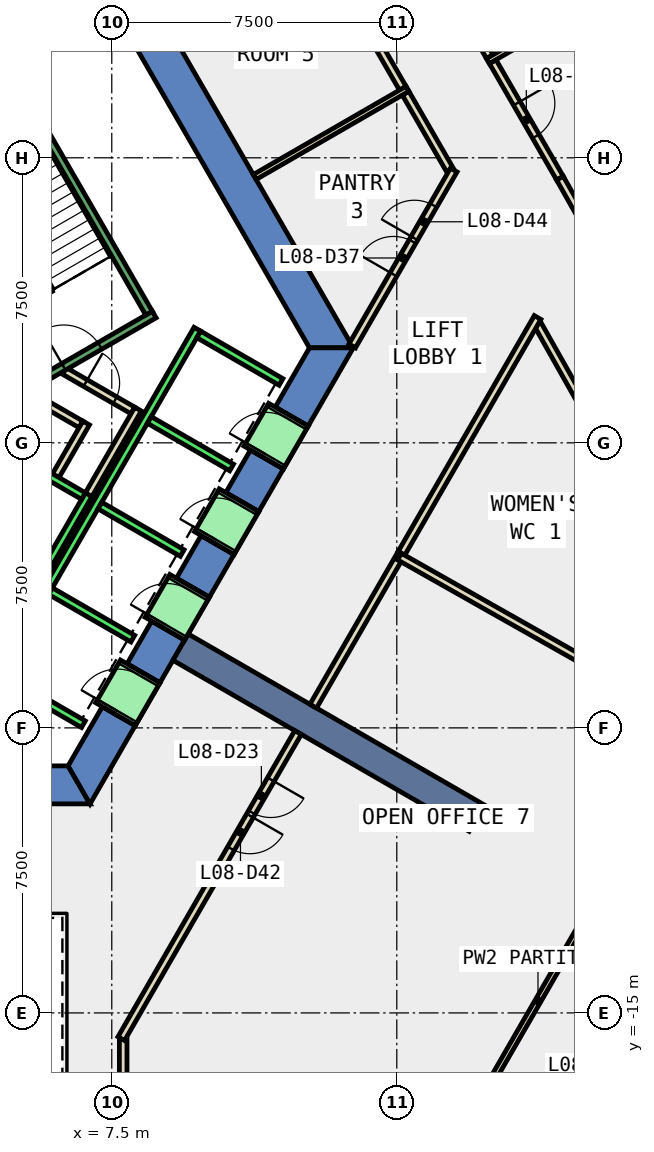
"""IFC4 building model, lengths in metres.
Left out: names, types, materials, properties, quantities, classifications, styles, units other than length and angle.
Written with IfcOpenShell. Run it as: python <this file> out.ifc"""

import sys

from ifc_helpers import new_model, si_unit, direction, frame, frame_2d, origin, place, context, subcontext, project, spatial, polyline, rectangle, outline, extrude, element, fill, save


model = new_model("IFC4")
c1 = context("Model", 3, precision=1e-05, world=origin(), true_north=direction((0.0, 1.0)))
c2 = subcontext(c1, "Body", "Model", "MODEL_VIEW")
j1 = project(units=[si_unit("LENGTHUNIT", "METRE"), si_unit("PLANEANGLEUNIT", "RADIAN")], contexts=[c1])
p1 = place(None, origin())
s1 = spatial("IfcSite", under=j1, at=p1, CompositionType="ELEMENT")
p2 = place(p1, origin())
s2 = spatial("IfcBuilding", under=s1, at=p2, CompositionType="ELEMENT")
p3 = place(p2, frame((0.0, 0.0, 43.4)))
s3 = spatial("IfcBuildingStorey", under=s2, at=p3, CompositionType="ELEMENT", Elevation=43.4)
p4 = place(p3, frame((0.0, 0.0, -0.4)))
e1 = element("IfcWall", 1, at=p4, inside=s3, PredefinedType="SHEAR", context=c2, shape_type="SweptSolid", body=[
    extrude(outline(polyline([(8.517, 11.748), (7.651, 11.248), (12.702, 2.5), (13.856, 2.5), (8.517, 11.748)])), origin(), (0.0, 0.0, 1.0), 4.2),
])
p5 = place(p3, frame((0.0, 0.0, -0.4)))
e2 = element("IfcWall", 2, at=p5, inside=s3, PredefinedType="SHEAR", context=c2, shape_type="SweptSolid", body=[
    extrude(outline(polyline([(5.75, -8.5), (5.75, -9.5), (6.928, -9.5), (6.351, -8.5), (5.75, -8.5)])), origin(), (0.0, 0.0, 1.0), 4.2),
])
p6 = place(p3, frame((0.0, 0.0, -0.4)))
e3 = element("IfcWall", 3, at=p6, inside=s3, PredefinedType="SHEAR", context=c2, shape_type="SweptSolid", body=[
    extrude(outline(polyline([(8.117, -7.44), (7.252, -6.94), (6.351, -8.5), (6.928, -9.5), (8.117, -7.44)])), origin(), (0.0, 0.0, 1.0), 4.2),
])
p7 = place(p3, frame((0.0, 0.0, -0.4)))
e4 = element("IfcWall", 4, at=p7, inside=s3, PredefinedType="SHEAR", context=c2, shape_type="SweptSolid", body=[
    extrude(outline(polyline([(9.417, -5.189), (8.551, -4.689), (7.902, -5.814), (8.767, -6.314), (9.417, -5.189)])), origin(), (0.0, 0.0, 1.0), 4.2),
])
p8 = place(p3, frame((0.0, 0.0, -0.4)))
e5 = element("IfcWall", 5, at=p8, inside=s3, PredefinedType="SHEAR", context=c2, shape_type="SweptSolid", body=[
    extrude(outline(polyline([(10.717, -2.937), (9.851, -2.437), (9.201, -3.563), (10.067, -4.063), (10.717, -2.937)])), origin(), (0.0, 0.0, 1.0), 4.2),
])
p9 = place(p3, frame((0.0, 0.0, -0.4)))
e6 = element("IfcWall", 6, at=p9, inside=s3, PredefinedType="SHEAR", context=c2, shape_type="SweptSolid", body=[
    extrude(outline(polyline([(12.017, -0.686), (11.151, -0.186), (10.501, -1.311), (11.367, -1.811), (12.017, -0.686)])), origin(), (0.0, 0.0, 1.0), 4.2),
])
p10 = place(p3, frame((0.0, 0.0, -0.4)))
e7 = element("IfcWall", 7, at=p10, inside=s3, PredefinedType="SHEAR", context=c2, shape_type="SweptSolid", body=[
    extrude(outline(polyline([(11.801, 0.94), (12.667, 0.44), (13.856, 2.5), (12.702, 2.5), (11.801, 0.94)])), origin(), (0.0, 0.0, 1.0), 4.2),
])
p11 = place(p3, frame((0.0, 0.0, 3.6)))
e8 = element("IfcWall", 8, at=p11, inside=s3, PredefinedType="SHEAR", context=c2, shape_type="SweptSolid", body=[
    extrude(outline(polyline([(8.767, -6.314), (7.902, -5.814), (7.252, -6.94), (8.117, -7.44), (8.767, -6.314)])), origin(), (0.0, 0.0, 1.0), 0.2),
])
p12 = place(p3, frame((0.0, 0.0, 3.6)))
e9 = element("IfcWall", 9, at=p12, inside=s3, PredefinedType="SHEAR", context=c2, shape_type="SweptSolid", body=[
    extrude(outline(polyline([(10.067, -4.063), (9.201, -3.563), (8.551, -4.689), (9.417, -5.189), (10.067, -4.063)])), origin(), (0.0, 0.0, 1.0), 0.2),
])
p13 = place(p3, frame((0.0, 0.0, 3.6)))
e10 = element("IfcWall", 10, at=p13, inside=s3, PredefinedType="SHEAR", context=c2, shape_type="SweptSolid", body=[
    extrude(outline(polyline([(11.367, -1.811), (10.501, -1.311), (9.851, -2.437), (10.717, -2.937), (11.367, -1.811)])), origin(), (0.0, 0.0, 1.0), 0.2),
])
p14 = place(p3, frame((0.0, 0.0, 3.6)))
e11 = element("IfcWall", 11, at=p14, inside=s3, PredefinedType="SHEAR", context=c2, shape_type="SweptSolid", body=[
    extrude(outline(polyline([(12.667, 0.44), (11.801, 0.94), (11.151, -0.186), (12.017, -0.686), (12.667, 0.44)])), origin(), (0.0, 0.0, 1.0), 0.2),
])
p15 = place(p3, frame((9.31, -5.375, -0.4), z_axis=(0.0, 0.0, 1.0), x_axis=(0.866017533419, -0.500013631625, 0.0)))
e12 = element("IfcWall", 12, at=p15, inside=s3, PredefinedType="SHEAR", context=c2, shape_type="SweptSolid", body=[
    extrude(rectangle(XDim=9.0, YDim=0.8, at=frame_2d((4.5, 0.0))), origin(), (0.0, 0.0, 1.0), 4.2),
])
p16 = place(p3, frame((15.157, 9.33, 0.0), z_axis=(0.0, 0.0, 1.0), x_axis=(-0.500058580706, 0.865991579556, 0.0)))
e13 = element("IfcWall", 13, at=p16, inside=s3, PredefinedType="PARTITIONING", context=c2, shape_type="SweptSolid", body=[
    extrude(rectangle(XDim=3.102, YDim=0.2, at=frame_2d((1.551, 0.0))), origin(), (0.0, 0.0, 1.0), 3.8),
])
p17 = place(p3, frame((16.399, 7.178, 0.0), z_axis=(0.0, 0.0, 1.0), x_axis=(-0.499873332494, 0.866098522953, 0.0)))
e14 = element("IfcWall", 14, at=p17, inside=s3, PredefinedType="PARTITIONING", context=c2, shape_type="SweptSolid", body=[
    extrude(rectangle(XDim=2.334, YDim=0.2, at=frame_2d((1.167, 0.0))), origin(), (0.0, 0.0, 1.0), 3.8),
])
p18 = place(p3, frame((20.751, -0.505, 0.0), z_axis=(0.0, 0.0, 1.0), x_axis=(-0.491284712602, 0.870999041999, 0.0)))
e15 = element("IfcWall", 15, at=p18, inside=s3, PredefinedType="PARTITIONING", context=c2, shape_type="SweptSolid", body=[
    extrude(rectangle(XDim=4.166, YDim=0.2, at=frame_2d((2.083, 0.0))), origin(), (0.0, 0.0, 1.0), 3.8),
])
p19 = place(p3, frame((17.524, 10.031, 0.0), z_axis=(0.0, 0.0, 1.0), x_axis=(0.499861717316, -0.86610522661, 0.0)))
e16 = element("IfcWall", 16, at=p19, inside=s3, PredefinedType="PARTITIONING", context=c2, shape_type="SweptSolid", body=[
    extrude(rectangle(XDim=3.541, YDim=0.2, at=frame_2d((1.771, 0.0))), origin(), (0.0, 0.0, 1.0), 3.8),
])
p20 = place(p19, frame((1.27, 0.0, 0.0)))
e17 = element("IfcOpeningElement", 17, at=p20, cuts=e16, PredefinedType="OPENING", context=c2, shape_type="SweptSolid", body=[
    extrude(rectangle(XDim=1.0, YDim=2.1, at=frame_2d((0.5, 1.05))), frame((0.0, 0.11, 0.0), z_axis=(0.0, -1.0, 0.0), x_axis=(1.0, 0.0, 0.0)), (0.0, 0.0, 1.0), 0.22),
])
p21 = place(p3, frame((19.294, 6.964, 0.0), z_axis=(0.0, 0.0, 1.0), x_axis=(0.491148159943, -0.871076050058, 0.0)))
e18 = element("IfcWall", 18, at=p21, inside=s3, PredefinedType="PARTITIONING", context=c2, shape_type="SweptSolid", body=[
    extrude(rectangle(XDim=3.541, YDim=0.2, at=frame_2d((1.771, 0.0))), origin(), (0.0, 0.0, 1.0), 3.8),
])
p22 = place(p3, frame((15.678, 13.226, 0.0), z_axis=(0.0, 0.0, 1.0), x_axis=(0.499951278228, -0.866053531485, 0.0)))
e19 = element("IfcWall", 19, at=p22, inside=s3, PredefinedType="PARTITIONING", context=c2, shape_type="SweptSolid", body=[
    extrude(rectangle(XDim=3.54, YDim=0.2, at=frame_2d((1.77, 0.0))), origin(), (0.0, 0.0, 1.0), 3.8),
])
p23 = place(p3, frame((5.499, 1.172, 0.0), z_axis=(0.0, 0.0, 1.0), x_axis=(0.866333505267, -0.499465972466, 0.0)))
e20 = element("IfcWall", 20, at=p23, inside=s3, PredefinedType="PARTITIONING", context=c2, shape_type="SweptSolid", body=[
    extrude(rectangle(XDim=1.374, YDim=0.2, at=frame_2d((0.687, 0.0))), origin(), (0.0, 0.0, 1.0), 3.8),
])
p24 = place(p3, frame((6.826, 0.522, 0.0), z_axis=(0.0, 0.0, 1.0), x_axis=(-0.500016722714, -0.866015748706, 0.0)))
e21 = element("IfcWall", 21, at=p24, inside=s3, PredefinedType="PARTITIONING", context=c2, shape_type="SweptSolid", body=[
    extrude(rectangle(XDim=1.7, YDim=0.2, at=frame_2d((0.85, 0.0))), origin(), (0.0, 0.0, 1.0), 3.8),
])
p25 = place(p3, frame((6.25, 1.894, 0.0), z_axis=(0.0, 0.0, 1.0), x_axis=(0.866043184279, -0.499969202016, 0.0)))
e22 = element("IfcWall", 22, at=p25, inside=s3, PredefinedType="PARTITIONING", context=c2, shape_type="SweptSolid", body=[
    extrude(rectangle(XDim=2.084, YDim=0.2, at=frame_2d((1.042, 0.0))), origin(), (0.0, 0.0, 1.0), 3.8),
])
p26 = place(p25, frame((0.642, 0.0, 0.0)))
e23 = element("IfcOpeningElement", 23, at=p26, cuts=e22, PredefinedType="OPENING", context=c2, shape_type="SweptSolid", body=[
    extrude(rectangle(XDim=0.9, YDim=2.1, at=frame_2d((0.45, 1.05))), frame((0.0, 0.11, 0.0), z_axis=(0.0, -1.0, 0.0), x_axis=(1.0, 0.0, 0.0)), (0.0, 0.0, 1.0), 0.22),
])
p27 = place(p3, frame((8.192, 0.888, 0.0), z_axis=(0.0, 0.0, 1.0), x_axis=(-0.499940625693, -0.866059680843, 0.0)))
e24 = element("IfcWall", 24, at=p27, inside=s3, PredefinedType="PARTITIONING", context=c2, shape_type="SweptSolid", body=[
    extrude(rectangle(XDim=2.68, YDim=0.2, at=frame_2d((1.34, 0.0))), origin(), (0.0, 0.0, 1.0), 3.8),
])
p28 = place(p3, frame((15.281, 9.315, 0.0), z_axis=(0.0, 0.0, 1.0), x_axis=(-0.86601742213, -0.500013824377, 0.0)))
e25 = element("IfcWall", 25, at=p28, inside=s3, PredefinedType="PARTITIONING", context=c2, shape_type="SweptSolid", body=[
    extrude(rectangle(XDim=4.642, YDim=0.15, at=frame_2d((2.321, 0.0))), origin(), (0.0, 0.0, 1.0), 3.8),
])
p29 = place(p3, frame((13.827, 2.55, 0.0), z_axis=(0.0, 0.0, 1.0), x_axis=(0.50002563942, 0.866010600352, 0.0)))
e26 = element("IfcWall", 26, at=p29, inside=s3, PredefinedType="PARTITIONING", context=c2, shape_type="SweptSolid", body=[
    extrude(rectangle(XDim=5.344, YDim=0.2, at=frame_2d((2.672, 0.0))), origin(), (0.0, 0.0, 1.0), 3.8),
])
p30 = place(p29, frame((2.172, 0.0, 0.0)))
e27 = element("IfcOpeningElement", 27, at=p30, cuts=e26, PredefinedType="OPENING", context=c2, shape_type="SweptSolid", body=[
    extrude(rectangle(XDim=1.0, YDim=2.1, at=frame_2d((0.5, 1.05))), frame((0.0, 0.11, 0.0), z_axis=(0.0, -1.0, 0.0), x_axis=(1.0, 0.0, 0.0)), (0.0, 0.0, 1.0), 0.22),
])
p31 = place(p29, frame((3.272, 0.0, 0.0)))
e28 = element("IfcOpeningElement", 28, at=p31, cuts=e26, PredefinedType="OPENING", context=c2, shape_type="SweptSolid", body=[
    extrude(rectangle(XDim=1.0, YDim=2.1, at=frame_2d((0.5, 1.05))), frame((0.0, 0.11, 0.0), z_axis=(0.0, -1.0, 0.0), x_axis=(1.0, 0.0, 0.0)), (0.0, 0.0, 1.0), 0.22),
])
p32 = place(p3, frame((7.8, -15.69, 0.0), z_axis=(0.0, 0.0, 1.0), x_axis=(0.0, -1.0, 0.0)))
e29 = element("IfcWall", 29, at=p32, inside=s3, PredefinedType="PARTITIONING", context=c2, shape_type="SweptSolid", body=[
    extrude(rectangle(XDim=1.967, YDim=0.2, at=frame_2d((0.983, 0.0))), origin(), (0.0, 0.0, 1.0), 3.8),
])
p33 = place(p3, frame((15.122, -2.908, 0.0), z_axis=(0.0, 0.0, 1.0), x_axis=(-0.499922740561, -0.866070004948, 0.0)))
e30 = element("IfcWall", 30, at=p33, inside=s3, PredefinedType="PARTITIONING", context=c2, shape_type="SweptSolid", body=[
    extrude(rectangle(XDim=4.643, YDim=0.2, at=frame_2d((2.321, 0.0))), origin(), (0.0, 0.0, 1.0), 3.8),
])
p34 = place(p3, frame((18.705, 3.298, 0.0), z_axis=(0.0, 0.0, 1.0), x_axis=(-0.499993769413, -0.866029000986, 0.0)))
e31 = element("IfcWall", 31, at=p34, inside=s3, PredefinedType="PARTITIONING", context=c2, shape_type="SweptSolid", body=[
    extrude(rectangle(XDim=7.166, YDim=0.2, at=frame_2d((3.583, 0.0))), origin(), (0.0, 0.0, 1.0), 3.8),
])
p35 = place(p3, frame((15.072, -2.994, 0.0), z_axis=(0.0, 0.0, 1.0), x_axis=(0.87054185148, -0.49209438609, 0.0)))
e32 = element("IfcWall", 32, at=p35, inside=s3, PredefinedType="PARTITIONING", context=c2, shape_type="SweptSolid", body=[
    extrude(rectangle(XDim=9.1, YDim=0.2, at=frame_2d((4.55, 0.0))), origin(), (0.0, 0.0, 1.0), 3.8),
])
p36 = place(p3, frame((20.445, -11.688, 0.0), z_axis=(0.0, 0.0, 1.0), x_axis=(-0.500010633597, -0.866019264387, 0.0)))
e33 = element("IfcWall", 33, at=p36, inside=s3, PredefinedType="PARTITIONING", context=c2, shape_type="SweptSolid", body=[
    extrude(rectangle(XDim=6.918, YDim=0.15, at=frame_2d((3.459, 0.0))), origin(), (0.0, 0.0, 1.0), 3.8),
])
p37 = place(p3, frame((17.399, 10.045, 0.0), z_axis=(0.0, 0.0, 1.0), x_axis=(0.865980803489, 0.500077242023, 0.0)))
e34 = element("IfcWall", 34, at=p37, inside=s3, PredefinedType="PARTITIONING", context=c2, shape_type="SweptSolid", body=[
    extrude(rectangle(XDim=8.101, YDim=0.15, at=frame_2d((4.05, 0.0))), origin(), (0.0, 0.0, 1.0), 3.8),
])
p38 = place(p3, frame((12.401, -7.621, 0.0), z_axis=(0.0, 0.0, 1.0), x_axis=(-0.499983724212, -0.866034800411, 0.0)))
e35 = element("IfcWall", 35, at=p38, inside=s3, PredefinedType="PARTITIONING", context=c2, shape_type="SweptSolid", body=[
    extrude(rectangle(XDim=9.302, YDim=0.2, at=frame_2d((4.651, 0.0))), origin(), (0.0, 0.0, 1.0), 3.8),
])
p39 = place(p38, frame((1.429, 0.0, 0.0)))
e36 = element("IfcOpeningElement", 36, at=p39, cuts=e35, PredefinedType="OPENING", context=c2, shape_type="SweptSolid", body=[
    extrude(rectangle(XDim=1.0, YDim=2.1, at=frame_2d((0.5, 1.05))), frame((0.0, 0.11, 0.0), z_axis=(0.0, -1.0, 0.0), x_axis=(1.0, 0.0, 0.0)), (0.0, 0.0, 1.0), 0.22),
])
p40 = place(p38, frame((2.529, 0.0, 0.0)))
e37 = element("IfcOpeningElement", 37, at=p40, cuts=e35, PredefinedType="OPENING", context=c2, shape_type="SweptSolid", body=[
    extrude(rectangle(XDim=1.0, YDim=2.1, at=frame_2d((0.5, 1.05))), frame((0.0, 0.11, 0.0), z_axis=(0.0, -1.0, 0.0), x_axis=(1.0, 0.0, 0.0)), (0.0, 0.0, 1.0), 0.22),
])
p41 = place(p3, frame((5.492, -3.788, 0.0), z_axis=(0.0, 0.0, 1.0), x_axis=(0.500011755427, 0.866018616679, 0.0)))
e38 = element("IfcWall", 38, at=p41, inside=s3, PredefinedType="STANDARD", context=c2, shape_type="SweptSolid", body=[
    extrude(rectangle(XDim=2.8, YDim=0.2, at=frame_2d((1.4, 0.0))), origin(), (0.0, 0.0, 1.0), 3.8),
])
p42 = place(p3, frame((4.677, -0.2, 0.0), z_axis=(0.0, 0.0, 1.0), x_axis=(0.865973769406, -0.500089422704, 0.0)))
e39 = element("IfcWall", 39, at=p42, inside=s3, PredefinedType="STANDARD", context=c2, shape_type="SweptSolid", body=[
    extrude(rectangle(XDim=2.399, YDim=0.2, at=frame_2d((1.2, 0.0))), origin(), (0.0, 0.0, 1.0), 3.8),
])
p43 = place(p3, frame((4.451, -6.19, 0.0), z_axis=(0.0, 0.0, 1.0), x_axis=(0.50000090737, 0.866024879913, 0.0)))
e40 = element("IfcWall", 40, at=p43, inside=s3, PredefinedType="STANDARD", context=c2, shape_type="SweptSolid", body=[
    extrude(rectangle(XDim=10.6, YDim=0.2, at=frame_2d((5.3, 0.0))), origin(), (0.0, 0.0, 1.0), 3.8),
])
for number, where, z_axis, x_axis in (
    (41, (4.588, -6.153, 0.0), (0.0, 0.0, 1.0), (0.866, -0.5, 0.0)),
    (42, (5.888, -3.902, 0.0), (0.0, 0.0, 1.0), (0.866, -0.5, 0.0)),
    (43, (7.188, -1.65, 0.0), (0.0, 0.0, 1.0), (0.866, -0.5, 0.0)),
    (44, (8.488, 0.602, 0.0), (0.0, 0.0, 1.0), (0.866, -0.5, 0.0)),
):
    element("IfcWall", number, at=place(p3, frame(where, z_axis=z_axis, x_axis=x_axis)), inside=s3, PredefinedType="STANDARD", context=c2, shape_type="SweptSolid", body=[
        extrude(rectangle(XDim=2.5, YDim=0.2, at=frame_2d((1.25, 0.0))), origin(), (0.0, 0.0, 1.0), 3.8),
    ])
p44 = place(p3, frame((9.788, 2.853, 0.0), z_axis=(0.0, 0.0, 1.0), x_axis=(0.865998541277, -0.500046524342, 0.0)))
e45 = element("IfcWall", 45, at=p44, inside=s3, PredefinedType="STANDARD", context=c2, shape_type="SweptSolid", body=[
    extrude(rectangle(XDim=2.5, YDim=0.2, at=frame_2d((1.25, 0.0))), origin(), (0.0, 0.0, 1.0), 3.8),
])
p45 = place(p3, frame((7.598, -7.14, 0.0), z_axis=(0.0, 0.0, 1.0), x_axis=(0.500362116554, 0.865816234728, 0.0)))
e46 = element("IfcWall", 46, at=p45, inside=s3, PredefinedType="STANDARD", context=c2, shape_type="SweptSolid", body=[
    extrude(rectangle(XDim=1.299, YDim=1.2, at=frame_2d((0.65, 0.0))), origin(), (0.0, 0.0, 1.0), 2.4),
])
p46 = place(p45, frame((0.1, 0.0, 0.0)))
e47 = element("IfcOpeningElement", 47, at=p46, cuts=e46, PredefinedType="OPENING", context=c2, shape_type="SweptSolid", body=[
    extrude(rectangle(XDim=1.1, YDim=2.3, at=frame_2d((0.55, 1.15))), frame((0.0, 0.61, 0.0), z_axis=(0.0, -1.0, 0.0), x_axis=(1.0, 0.0, 0.0)), (0.0, 0.0, 1.0), 1.22),
])
p47 = place(p3, frame((8.898, -4.889, 0.0), z_axis=(0.0, 0.0, 1.0), x_axis=(0.500036693733, 0.866004217611, 0.0)))
e48 = element("IfcWall", 48, at=p47, inside=s3, PredefinedType="STANDARD", context=c2, shape_type="SweptSolid", body=[
    extrude(rectangle(XDim=1.3, YDim=1.2, at=frame_2d((0.65, 0.0))), origin(), (0.0, 0.0, 1.0), 2.4),
])
p48 = place(p47, frame((0.1, 0.0, 0.0)))
e49 = element("IfcOpeningElement", 49, at=p48, cuts=e48, PredefinedType="OPENING", context=c2, shape_type="SweptSolid", body=[
    extrude(rectangle(XDim=1.1, YDim=2.3, at=frame_2d((0.55, 1.15))), frame((0.0, 0.61, 0.0), z_axis=(0.0, -1.0, 0.0), x_axis=(1.0, 0.0, 0.0)), (0.0, 0.0, 1.0), 1.22),
])
p49 = place(p3, frame((10.198, -2.637, 0.0), z_axis=(0.0, 0.0, 1.0), x_axis=(0.49989585183, 0.866085525409, 0.0)))
e50 = element("IfcWall", 50, at=p49, inside=s3, PredefinedType="STANDARD", context=c2, shape_type="SweptSolid", body=[
    extrude(rectangle(XDim=1.3, YDim=1.2, at=frame_2d((0.65, 0.0))), origin(), (0.0, 0.0, 1.0), 2.4),
])
p50 = place(p49, frame((0.1, 0.0, 0.0)))
e51 = element("IfcOpeningElement", 51, at=p50, cuts=e50, PredefinedType="OPENING", context=c2, shape_type="SweptSolid", body=[
    extrude(rectangle(XDim=1.1, YDim=2.3, at=frame_2d((0.55, 1.15))), frame((0.0, 0.61, 0.0), z_axis=(0.0, -1.0, 0.0), x_axis=(1.0, 0.0, 0.0)), (0.0, 0.0, 1.0), 1.22),
])
p51 = place(p3, frame((11.498, -0.385, 0.0), z_axis=(0.0, 0.0, 1.0), x_axis=(0.500221244143, 0.865897630733, 0.0)))
e52 = element("IfcWall", 52, at=p51, inside=s3, PredefinedType="STANDARD", context=c2, shape_type="SweptSolid", body=[
    extrude(rectangle(XDim=1.299, YDim=1.2, at=frame_2d((0.65, 0.0))), origin(), (0.0, 0.0, 1.0), 2.4),
])
p52 = place(p51, frame((0.1, 0.0, 0.0)))
e53 = element("IfcOpeningElement", 53, at=p52, cuts=e52, PredefinedType="OPENING", context=c2, shape_type="SweptSolid", body=[
    extrude(rectangle(XDim=1.1, YDim=2.3, at=frame_2d((0.55, 1.15))), frame((0.0, 0.61, 0.0), z_axis=(0.0, -1.0, 0.0), x_axis=(1.0, 0.0, 0.0)), (0.0, 0.0, 1.0), 1.22),
])
p53 = place(p3, frame((4.806, 1.176, 0.0), z_axis=(0.0, 0.0, 1.0), x_axis=(0.866059941101, 0.499940174841, 0.0)))
e54 = element("IfcWall", 54, at=p53, inside=s3, PredefinedType="STANDARD", context=c2, shape_type="SweptSolid", body=[
    extrude(rectangle(XDim=4.4, YDim=0.2, at=frame_2d((2.2, 0.0))), origin(), (0.0, 0.0, 1.0), 3.8),
])
p54 = place(p53, frame((1.65, 0.0, 0.0)))
e55 = element("IfcOpeningElement", 55, at=p54, cuts=e54, PredefinedType="OPENING", context=c2, shape_type="SweptSolid", body=[
    extrude(rectangle(XDim=1.1, YDim=2.2, at=frame_2d((0.55, 1.1))), frame((0.0, 0.11, 0.0), z_axis=(0.0, -1.0, 0.0), x_axis=(1.0, 0.0, 0.0)), (0.0, 0.0, 1.0), 0.22),
])
p55 = place(p3, frame((8.48, 3.412, 0.0), z_axis=(0.0, 0.0, 1.0), x_axis=(-0.499978703459, 0.866037698999, 0.0)))
e56 = element("IfcWall", 56, at=p55, inside=s3, PredefinedType="STANDARD", context=c2, shape_type="SweptSolid", body=[
    extrude(rectangle(XDim=6.9, YDim=0.2, at=frame_2d((3.45, 0.0))), origin(), (0.0, 0.0, 1.0), 3.8),
])
p56 = place(p20, origin())
e57 = element("IfcDoor", 57, at=p56, inside=s3, OperationType="SINGLE_SWING_LEFT", PredefinedType="DOOR", context=c2, shape_type="SweptSolid", body=[
    extrude(rectangle(XDim=1.0, YDim=2.1, at=frame_2d((0.5, 1.05))), frame((0.0, 0.025, 0.0), z_axis=(0.0, -1.0, 0.0), x_axis=(1.0, 0.0, 0.0)), (0.0, 0.0, 1.0), 0.05),
])
fill(e17, e57)
p57 = place(p39, origin())
e58 = element("IfcDoor", 58, at=p57, inside=s3, OperationType="SINGLE_SWING_LEFT", PredefinedType="DOOR", context=c2, shape_type="SweptSolid", body=[
    extrude(rectangle(XDim=1.0, YDim=2.1, at=frame_2d((0.5, 1.05))), frame((0.0, 0.025, 0.0), z_axis=(0.0, -1.0, 0.0), x_axis=(1.0, 0.0, 0.0)), (0.0, 0.0, 1.0), 0.05),
])
fill(e36, e58)
p58 = place(p30, origin())
e59 = element("IfcDoor", 59, at=p58, inside=s3, OperationType="SINGLE_SWING_LEFT", PredefinedType="DOOR", context=c2, shape_type="SweptSolid", body=[
    extrude(rectangle(XDim=1.0, YDim=2.1, at=frame_2d((0.5, 1.05))), frame((0.0, 0.025, 0.0), z_axis=(0.0, -1.0, 0.0), x_axis=(1.0, 0.0, 0.0)), (0.0, 0.0, 1.0), 0.05),
])
fill(e27, e59)
p59 = place(p26, origin())
e60 = element("IfcDoor", 60, at=p59, inside=s3, OperationType="SINGLE_SWING_LEFT", PredefinedType="DOOR", context=c2, shape_type="SweptSolid", body=[
    extrude(rectangle(XDim=0.9, YDim=2.1, at=frame_2d((0.45, 1.05))), frame((0.0, 0.025, 0.0), z_axis=(0.0, -1.0, 0.0), x_axis=(1.0, 0.0, 0.0)), (0.0, 0.0, 1.0), 0.05),
])
fill(e23, e60)
p60 = place(p40, origin())
e61 = element("IfcDoor", 61, at=p60, inside=s3, OperationType="SINGLE_SWING_RIGHT", PredefinedType="DOOR", context=c2, shape_type="SweptSolid", body=[
    extrude(rectangle(XDim=1.0, YDim=2.1, at=frame_2d((0.5, 1.05))), frame((0.0, 0.025, 0.0), z_axis=(0.0, -1.0, 0.0), x_axis=(1.0, 0.0, 0.0)), (0.0, 0.0, 1.0), 0.05),
])
fill(e37, e61)
p61 = place(p31, origin())
e62 = element("IfcDoor", 62, at=p61, inside=s3, OperationType="SINGLE_SWING_RIGHT", PredefinedType="DOOR", context=c2, shape_type="SweptSolid", body=[
    extrude(rectangle(XDim=1.0, YDim=2.1, at=frame_2d((0.5, 1.05))), frame((0.0, 0.025, 0.0), z_axis=(0.0, -1.0, 0.0), x_axis=(1.0, 0.0, 0.0)), (0.0, 0.0, 1.0), 0.05),
])
fill(e28, e62)
p62 = place(p46, origin())
e63 = element("IfcDoor", 63, at=p62, inside=s3, OperationType="SLIDING_TO_LEFT", PredefinedType="DOOR", context=c2, shape_type="SweptSolid", body=[
    extrude(rectangle(XDim=1.1, YDim=2.3, at=frame_2d((0.55, 1.15))), frame((0.0, 0.025, 0.0), z_axis=(0.0, -1.0, 0.0), x_axis=(1.0, 0.0, 0.0)), (0.0, 0.0, 1.0), 0.05),
])
fill(e47, e63)
p63 = place(p48, origin())
e64 = element("IfcDoor", 64, at=p63, inside=s3, OperationType="SLIDING_TO_LEFT", PredefinedType="DOOR", context=c2, shape_type="SweptSolid", body=[
    extrude(rectangle(XDim=1.1, YDim=2.3, at=frame_2d((0.55, 1.15))), frame((0.0, 0.025, 0.0), z_axis=(0.0, -1.0, 0.0), x_axis=(1.0, 0.0, 0.0)), (0.0, 0.0, 1.0), 0.05),
])
fill(e49, e64)
p64 = place(p50, origin())
e65 = element("IfcDoor", 65, at=p64, inside=s3, OperationType="SLIDING_TO_LEFT", PredefinedType="DOOR", context=c2, shape_type="SweptSolid", body=[
    extrude(rectangle(XDim=1.1, YDim=2.3, at=frame_2d((0.55, 1.15))), frame((0.0, 0.025, 0.0), z_axis=(0.0, -1.0, 0.0), x_axis=(1.0, 0.0, 0.0)), (0.0, 0.0, 1.0), 0.05),
])
fill(e51, e65)
p65 = place(p52, origin())
e66 = element("IfcDoor", 66, at=p65, inside=s3, OperationType="SLIDING_TO_LEFT", PredefinedType="DOOR", context=c2, shape_type="SweptSolid", body=[
    extrude(rectangle(XDim=1.1, YDim=2.3, at=frame_2d((0.55, 1.15))), frame((0.0, 0.025, 0.0), z_axis=(0.0, -1.0, 0.0), x_axis=(1.0, 0.0, 0.0)), (0.0, 0.0, 1.0), 0.05),
])
fill(e53, e66)
p66 = place(p54, origin())
e67 = element("IfcDoor", 67, at=p66, inside=s3, OperationType="SINGLE_SWING_LEFT", PredefinedType="DOOR", context=c2, shape_type="SweptSolid", body=[
    extrude(rectangle(XDim=1.1, YDim=2.2, at=frame_2d((0.55, 1.1))), frame((0.0, 0.025, 0.0), z_axis=(0.0, -1.0, 0.0), x_axis=(1.0, 0.0, 0.0)), (0.0, 0.0, 1.0), 0.05),
])
fill(e55, e67)
save(model, sys.argv[1])
